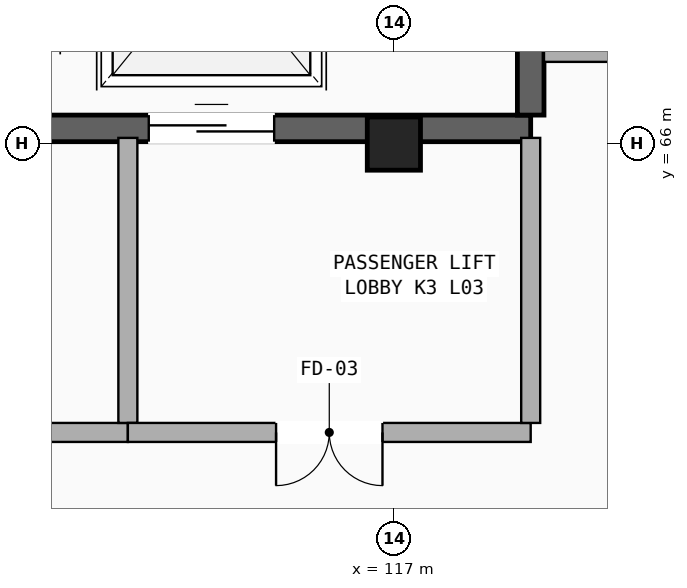
"""IFC4 building model, lengths in metres.
Left out: names, types, materials, properties, quantities, classifications, styles, units other than length and angle.
Written with IfcOpenShell. Run it as: python <this file> out.ifc"""

import sys

from ifc_helpers import new_model, si_unit, direction, frame, frame_2d, origin, origin_2d, place, context, subcontext, project, spatial, rectangle, extrude, element, fill, save


model = new_model("IFC4")
c1 = context("Model", 3, precision=1e-05, world=origin(), true_north=direction((0.0, 1.0)))
c2 = subcontext(c1, "Body", "Model", "MODEL_VIEW")
j1 = project(units=[si_unit("LENGTHUNIT", "METRE"), si_unit("PLANEANGLEUNIT", "RADIAN")], contexts=[c1])
p1 = place(None, origin())
s1 = spatial("IfcSite", under=j1, at=p1, CompositionType="ELEMENT")
p2 = place(p1, origin())
s2 = spatial("IfcBuilding", under=s1, at=p2, CompositionType="ELEMENT")
p3 = place(p2, frame((0.0, 0.0, 13.6)))
s3 = spatial("IfcBuildingStorey", under=s2, at=p3, CompositionType="ELEMENT", Elevation=13.6)
p4 = place(p3, frame((117.0, 66.0, 0.0), z_axis=(0.0, 0.0, 1.0), x_axis=(1.0, 0.0, 0.0)))
e1 = element("IfcColumn", 1, at=p4, inside=s3, PredefinedType="COLUMN", context=c2, shape_type="SweptSolid", body=[
    extrude(rectangle(XDim=0.7, YDim=0.7, at=origin_2d()), origin(), (0.0, 0.0, 1.0), 4.08),
])
p5 = place(p3, frame((108.5, 66.2, 0.0), z_axis=(0.0, 0.0, 1.0), x_axis=(1.0, 0.0, 0.0)))
e2 = element("IfcWall", 2, at=p5, inside=s3, PredefinedType="SHEAR", context=c2, shape_type="SweptSolid", body=[
    extrude(rectangle(XDim=10.3, YDim=0.35, at=frame_2d((5.15, 0.0))), origin(), (0.0, 0.0, 1.0), 4.08),
])
p6 = place(p5, frame((0.45, 0.0, 0.0)))
e3 = element("IfcOpeningElement", 3, at=p6, cuts=e2, PredefinedType="OPENING", context=c2, shape_type="SweptSolid", body=[
    extrude(rectangle(XDim=1.1, YDim=2.2, at=frame_2d((0.55, 1.1))), frame((0.0, 0.185, 0.0), z_axis=(0.0, -1.0, 0.0), x_axis=(1.0, 0.0, 0.0)), (0.0, 0.0, 1.0), 0.37),
])
p7 = place(p5, frame((2.09, 0.0, 0.0)))
e4 = element("IfcOpeningElement", 4, at=p7, cuts=e2, PredefinedType="OPENING", context=c2, shape_type="SweptSolid", body=[
    extrude(rectangle(XDim=1.22, YDim=2.2, at=frame_2d((0.61, 1.1))), frame((0.0, 0.185, 0.0), z_axis=(0.0, -1.0, 0.0), x_axis=(1.0, 0.0, 0.0)), (0.0, 0.0, 1.0), 0.37),
])
p8 = place(p5, frame((5.275, 0.0, 0.0)))
e5 = element("IfcOpeningElement", 5, at=p8, cuts=e2, PredefinedType="OPENING", context=c2, shape_type="SweptSolid", body=[
    extrude(rectangle(XDim=1.65, YDim=2.34, at=frame_2d((0.825, 1.17))), frame((0.0, 0.185, 0.0), z_axis=(0.0, -1.0, 0.0), x_axis=(1.0, 0.0, 0.0)), (0.0, 0.0, 1.0), 0.37),
])
p9 = place(p3, frame((118.8, 66.375, 0.0), z_axis=(0.0, 0.0, 1.0), x_axis=(0.0, 1.0, 0.0)))
e6 = element("IfcWall", 6, at=p9, inside=s3, PredefinedType="SHEAR", context=c2, shape_type="SweptSolid", body=[
    extrude(rectangle(XDim=8.25, YDim=0.35, at=frame_2d((4.125, 0.0))), origin(), (0.0, 0.0, 1.0), 4.08),
])
p10 = place(p3, frame((108.5, 62.2, 0.0), z_axis=(0.0, 0.0, 1.0), x_axis=(1.0, 0.0, 0.0)))
e7 = element("IfcWall", 7, at=p10, inside=s3, PredefinedType="PARTITIONING", context=c2, shape_type="SweptSolid", body=[
    extrude(rectangle(XDim=5.0, YDim=0.25, at=frame_2d((2.5, 0.0))), origin(), (0.0, 0.0, 1.0), 3.84),
])
p11 = place(p10, frame((1.95, 0.0, 0.0)))
e8 = element("IfcOpeningElement", 8, at=p11, cuts=e7, PredefinedType="OPENING", context=c2, shape_type="SweptSolid", body=[
    extrude(rectangle(XDim=1.1, YDim=2.2, at=frame_2d((0.55, 1.1))), frame((0.0, 0.135, 0.0), z_axis=(0.0, -1.0, 0.0), x_axis=(1.0, 0.0, 0.0)), (0.0, 0.0, 1.0), 0.27),
])
p12 = place(p3, frame((113.5, 62.325, 0.0), z_axis=(0.0, 0.0, 1.0), x_axis=(0.0, 1.0, 0.0)))
e9 = element("IfcWall", 9, at=p12, inside=s3, PredefinedType="PARTITIONING", context=c2, shape_type="SweptSolid", body=[
    extrude(rectangle(XDim=3.75, YDim=0.25, at=frame_2d((1.875, 0.0))), origin(), (0.0, 0.0, 1.0), 2.97),
])
p13 = place(p3, frame((113.5, 62.2, 0.0), z_axis=(0.0, 0.0, 1.0), x_axis=(1.0, 0.0, 0.0)))
e10 = element("IfcWall", 10, at=p13, inside=s3, PredefinedType="PARTITIONING", context=c2, shape_type="SweptSolid", body=[
    extrude(rectangle(XDim=5.3, YDim=0.25, at=frame_2d((2.65, 0.0))), origin(), (0.0, 0.0, 1.0), 3.84),
])
p14 = place(p13, frame((1.95, 0.0, 0.0)))
e11 = element("IfcOpeningElement", 11, at=p14, cuts=e10, PredefinedType="OPENING", context=c2, shape_type="SweptSolid", body=[
    extrude(rectangle(XDim=1.4, YDim=2.2, at=frame_2d((0.7, 1.1))), frame((0.0, 0.135, 0.0), z_axis=(0.0, -1.0, 0.0), x_axis=(1.0, 0.0, 0.0)), (0.0, 0.0, 1.0), 0.27),
])
p15 = place(p3, frame((118.8, 62.325, 0.0), z_axis=(0.0, 0.0, 1.0), x_axis=(0.0, 1.0, 0.0)))
e12 = element("IfcWall", 12, at=p15, inside=s3, PredefinedType="PARTITIONING", context=c2, shape_type="SweptSolid", body=[
    extrude(rectangle(XDim=3.75, YDim=0.25, at=frame_2d((1.875, 0.0))), origin(), (0.0, 0.0, 1.0), 2.82),
])
p16 = place(p3, frame((118.975, 67.2, 0.0), z_axis=(0.0, 0.0, 1.0), x_axis=(1.0, 0.0, 0.0)))
e13 = element("IfcWall", 13, at=p16, inside=s3, PredefinedType="PARTITIONING", context=c2, shape_type="SweptSolid", body=[
    extrude(rectangle(XDim=15.225, YDim=0.25, at=frame_2d((7.612, 0.0))), origin(), (0.0, 0.0, 1.0), 3.17),
])
p17 = place(p8, origin())
e14 = element("IfcDoor", 14, at=p17, inside=s3, OperationType="SLIDING_TO_LEFT", PredefinedType="DOOR", context=c2, shape_type="SweptSolid", body=[
    extrude(rectangle(XDim=1.65, YDim=2.34, at=frame_2d((0.825, 1.17))), frame((0.0, 0.025, 0.0), z_axis=(0.0, -1.0, 0.0), x_axis=(1.0, 0.0, 0.0)), (0.0, 0.0, 1.0), 0.05),
])
fill(e5, e14)
p18 = place(p14, frame((1.4, 0.0, 0.0), z_axis=(0.0, 0.0, 1.0), x_axis=(-1.0, 0.0, 0.0)))
e15 = element("IfcDoor", 15, at=p18, inside=s3, OperationType="DOUBLE_DOOR_SINGLE_SWING", PredefinedType="DOOR", context=c2, shape_type="SweptSolid", body=[
    extrude(rectangle(XDim=1.4, YDim=2.2, at=frame_2d((0.7, 1.1))), frame((0.0, 0.025, 0.0), z_axis=(0.0, -1.0, 0.0), x_axis=(1.0, 0.0, 0.0)), (0.0, 0.0, 1.0), 0.05),
])
fill(e11, e15)
save(model, sys.argv[1])
